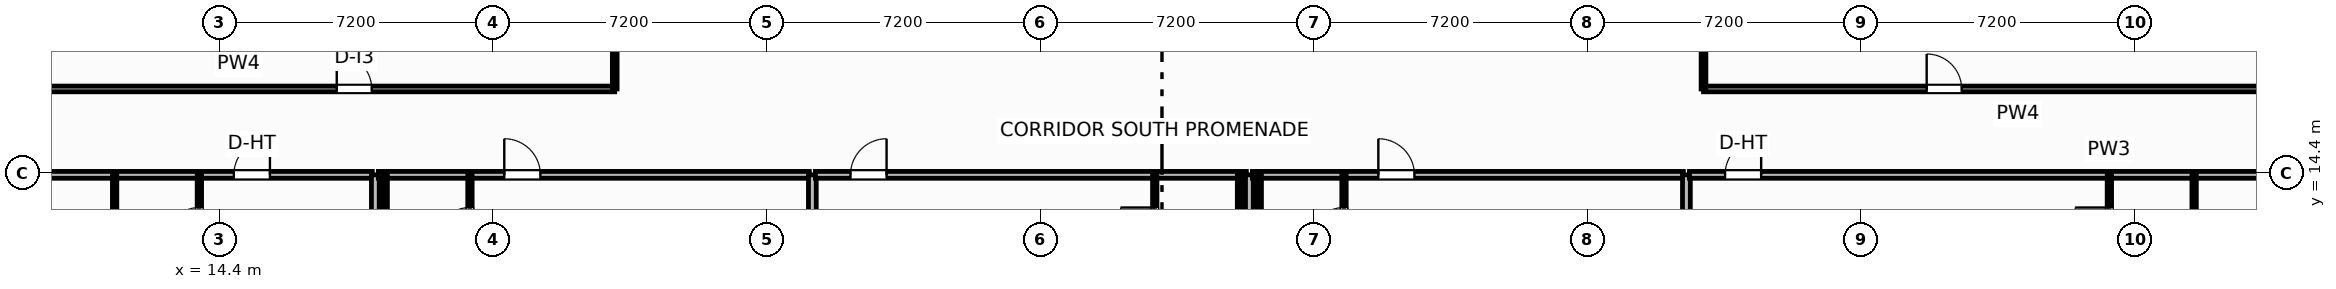
"""IFC4 building model, lengths in metres.
Left out: names, types, materials, properties, quantities, classifications, styles, units other than length and angle.
Written with IfcOpenShell. Run it as: python <this file> out.ifc"""

import sys

from ifc_helpers import new_model, si_unit, direction, frame, frame_2d, origin, place, context, subcontext, project, spatial, rectangle, extrude, element, fill, save


model = new_model("IFC4")
c1 = context("Model", 3, precision=1e-05, world=origin(), true_north=direction((0.0, 1.0)))
c2 = subcontext(c1, "Body", "Model", "MODEL_VIEW")
j1 = project(units=[si_unit("LENGTHUNIT", "METRE"), si_unit("PLANEANGLEUNIT", "RADIAN")], contexts=[c1])
p1 = place(None, origin())
s1 = spatial("IfcSite", under=j1, at=p1, CompositionType="ELEMENT")
p2 = place(p1, origin())
s2 = spatial("IfcBuilding", under=s1, at=p2, CompositionType="ELEMENT")
p3 = place(p2, frame((0.0, 0.0, 136.5)))
s3 = spatial("IfcBuildingStorey", under=s2, at=p3, CompositionType="ELEMENT", Elevation=136.5)
p4 = place(p3, frame((5.0, 16.61, 0.0), z_axis=(0.0, 0.0, 1.0), x_axis=(1.0, 0.0, 0.0)))
e1 = element("IfcWall", 1, at=p4, inside=s3, PredefinedType="PARTITIONING", context=c2, shape_type="SweptSolid", body=[
    extrude(rectangle(XDim=19.8, YDim=0.15, at=frame_2d((9.9, 0.0))), origin(), (0.0, 0.0, 1.0), 3.45),
])
p5 = place(p4, frame((12.485, 0.0, 0.0)))
e2 = element("IfcOpeningElement", 2, at=p5, cuts=e1, PredefinedType="OPENING", context=c2, shape_type="SweptSolid", body=[
    extrude(rectangle(XDim=0.92, YDim=2.05, at=frame_2d((0.46, 1.025))), frame((0.0, 0.085, 0.0), z_axis=(0.0, -1.0, 0.0), x_axis=(1.0, 0.0, 0.0)), (0.0, 0.0, 1.0), 0.17),
])
p6 = place(p3, frame((24.8, 16.61, 0.0), z_axis=(0.0, 0.0, 1.0), x_axis=(0.0, 1.0, 0.0)))
e3 = element("IfcWall", 3, at=p6, inside=s3, PredefinedType="PARTITIONING", context=c2, shape_type="SweptSolid", body=[
    extrude(rectangle(XDim=2.63, YDim=0.125, at=frame_2d((1.315, 0.0))), origin(), (0.0, 0.0, 1.0), 2.662),
])
p7 = place(p3, frame((53.45, 16.61, 0.0), z_axis=(0.0, 0.0, 1.0), x_axis=(1.0, 0.0, 0.0)))
e4 = element("IfcWall", 4, at=p7, inside=s3, PredefinedType="PARTITIONING", context=c2, shape_type="SweptSolid", body=[
    extrude(rectangle(XDim=16.55, YDim=0.15, at=frame_2d((8.275, 0.0))), origin(), (0.0, 0.0, 1.0), 3.45),
])
p8 = place(p7, frame((5.873, 0.0, 0.0)))
e5 = element("IfcOpeningElement", 5, at=p8, cuts=e4, PredefinedType="OPENING", context=c2, shape_type="SweptSolid", body=[
    extrude(rectangle(XDim=0.92, YDim=2.05, at=frame_2d((0.46, 1.025))), frame((0.0, 0.085, 0.0), z_axis=(0.0, -1.0, 0.0), x_axis=(1.0, 0.0, 0.0)), (0.0, 0.0, 1.0), 0.17),
])
p9 = place(p3, frame((53.45, 16.61, 0.0), z_axis=(0.0, 0.0, 1.0), x_axis=(0.0, 1.0, 0.0)))
e6 = element("IfcWall", 6, at=p9, inside=s3, PredefinedType="PARTITIONING", context=c2, shape_type="SweptSolid", body=[
    extrude(rectangle(XDim=2.63, YDim=0.125, at=frame_2d((1.315, 0.0))), origin(), (0.0, 0.0, 1.0), 3.45),
])
p10 = place(p3, frame((0.581, 14.35, 0.0), z_axis=(0.0, 0.0, 1.0), x_axis=(1.0, 0.0, 0.0)))
e7 = element("IfcWall", 7, at=p10, inside=s3, PredefinedType="PARTITIONING", context=c2, shape_type="SweptSolid", body=[
    extrude(rectangle(XDim=17.839, YDim=0.18, at=frame_2d((8.919, 0.0))), origin(), (0.0, 0.0, 1.0), 3.45),
])
p11 = place(p10, frame((14.196, 0.0, 0.0)))
e8 = element("IfcOpeningElement", 8, at=p11, cuts=e7, PredefinedType="OPENING", context=c2, shape_type="SweptSolid", body=[
    extrude(rectangle(XDim=0.95, YDim=2.15, at=frame_2d((0.475, 1.075))), frame((0.0, 0.1, 0.0), z_axis=(0.0, -1.0, 0.0), x_axis=(1.0, 0.0, 0.0)), (0.0, 0.0, 1.0), 0.2),
])
p12 = place(p3, frame((13.87, 11.83, 0.0), z_axis=(0.0, 0.0, 1.0), x_axis=(0.0, 1.0, 0.0)))
e9 = element("IfcWall", 9, at=p12, inside=s3, PredefinedType="PARTITIONING", context=c2, shape_type="SweptSolid", body=[
    extrude(rectangle(XDim=2.52, YDim=0.115, at=frame_2d((1.26, 0.0))), origin(), (0.0, 0.0, 1.0), 3.45),
])
p13 = place(p12, frame((0.76, 0.0, 0.0)))
e10 = element("IfcOpeningElement", 10, at=p13, cuts=e9, PredefinedType="OPENING", context=c2, shape_type="SweptSolid", body=[
    extrude(rectangle(XDim=0.9, YDim=2.05, at=frame_2d((0.45, 1.025))), frame((0.0, 0.067, 0.0), z_axis=(0.0, -1.0, 0.0), x_axis=(1.0, 0.0, 0.0)), (0.0, 0.0, 1.0), 0.135),
])
p14 = place(p3, frame((11.64, 11.83, 0.0), z_axis=(0.0, 0.0, 1.0), x_axis=(0.0, 1.0, 0.0)))
e11 = element("IfcWall", 11, at=p14, inside=s3, PredefinedType="PARTITIONING", context=c2, shape_type="SweptSolid", body=[
    extrude(rectangle(XDim=2.52, YDim=0.115, at=frame_2d((1.26, 0.0))), origin(), (0.0, 0.0, 1.0), 3.45),
])
p15 = place(p3, frame((18.5, 4.379, 0.0), z_axis=(0.0, 0.0, 1.0), x_axis=(0.0, 1.0, 0.0)))
e12 = element("IfcWall", 12, at=p15, inside=s3, PredefinedType="PARTITIONING", context=c2, shape_type="SweptSolid", body=[
    extrude(rectangle(XDim=9.971, YDim=0.205, at=frame_2d((4.985, 0.0))), origin(), (0.0, 0.0, 1.0), 3.45),
])
p16 = place(p3, frame((18.58, 14.35, 0.0), z_axis=(0.0, 0.0, 1.0), x_axis=(1.0, 0.0, 0.0)))
e13 = element("IfcWall", 13, at=p16, inside=s3, PredefinedType="PARTITIONING", context=c2, shape_type="SweptSolid", body=[
    extrude(rectangle(XDim=11.34, YDim=0.18, at=frame_2d((5.67, 0.0))), origin(), (0.0, 0.0, 1.0), 3.45),
])
p17 = place(p16, frame((3.313, 0.0, 0.0)))
e14 = element("IfcOpeningElement", 14, at=p17, cuts=e13, PredefinedType="OPENING", context=c2, shape_type="SweptSolid", body=[
    extrude(rectangle(XDim=0.95, YDim=2.15, at=frame_2d((0.475, 1.075))), frame((0.0, 0.1, 0.0), z_axis=(0.0, -1.0, 0.0), x_axis=(1.0, 0.0, 0.0)), (0.0, 0.0, 1.0), 0.2),
])
p18 = place(p3, frame((20.99, 11.83, 0.0), z_axis=(0.0, 0.0, 1.0), x_axis=(0.0, 1.0, 0.0)))
e15 = element("IfcWall", 15, at=p18, inside=s3, PredefinedType="PARTITIONING", context=c2, shape_type="SweptSolid", body=[
    extrude(rectangle(XDim=2.52, YDim=0.115, at=frame_2d((1.26, 0.0))), origin(), (0.0, 0.0, 1.0), 3.45),
])
p19 = place(p18, frame((0.76, 0.0, 0.0)))
e16 = element("IfcOpeningElement", 16, at=p19, cuts=e15, PredefinedType="OPENING", context=c2, shape_type="SweptSolid", body=[
    extrude(rectangle(XDim=0.9, YDim=2.05, at=frame_2d((0.45, 1.025))), frame((0.0, 0.067, 0.0), z_axis=(0.0, -1.0, 0.0), x_axis=(1.0, 0.0, 0.0)), (0.0, 0.0, 1.0), 0.135),
])
p20 = place(p3, frame((18.76, 11.83, 0.0), z_axis=(0.0, 0.0, 1.0), x_axis=(0.0, 1.0, 0.0)))
e17 = element("IfcWall", 17, at=p20, inside=s3, PredefinedType="PARTITIONING", context=c2, shape_type="SweptSolid", body=[
    extrude(rectangle(XDim=2.52, YDim=0.115, at=frame_2d((1.26, 0.0))), origin(), (0.0, 0.0, 1.0), 3.45),
])
p21 = place(p3, frame((30.0, 5.1, 0.0), z_axis=(0.0, 0.0, 1.0), x_axis=(0.0, 1.0, 0.0)))
e18 = element("IfcWall", 18, at=p21, inside=s3, PredefinedType="PARTITIONING", context=c2, shape_type="SweptSolid", body=[
    extrude(rectangle(XDim=9.25, YDim=0.205, at=frame_2d((4.625, 0.0))), origin(), (0.0, 0.0, 1.0), 3.45),
])
p22 = place(p3, frame((30.08, 14.35, 0.0), z_axis=(0.0, 0.0, 1.0), x_axis=(1.0, 0.0, 0.0)))
e19 = element("IfcWall", 19, at=p22, inside=s3, PredefinedType="PARTITIONING", context=c2, shape_type="SweptSolid", body=[
    extrude(rectangle(XDim=11.34, YDim=0.18, at=frame_2d((5.67, 0.0))), origin(), (0.0, 0.0, 1.0), 3.45),
])
p23 = place(p22, frame((0.923, 0.0, 0.0)))
e20 = element("IfcOpeningElement", 20, at=p23, cuts=e19, PredefinedType="OPENING", context=c2, shape_type="SweptSolid", body=[
    extrude(rectangle(XDim=0.95, YDim=2.15, at=frame_2d((0.475, 1.075))), frame((0.0, 0.1, 0.0), z_axis=(0.0, -1.0, 0.0), x_axis=(1.0, 0.0, 0.0)), (0.0, 0.0, 1.0), 0.2),
])
p24 = place(p3, frame((39.01, 11.83, 0.0), z_axis=(0.0, 0.0, 1.0), x_axis=(0.0, 1.0, 0.0)))
e21 = element("IfcWall", 21, at=p24, inside=s3, PredefinedType="PARTITIONING", context=c2, shape_type="SweptSolid", body=[
    extrude(rectangle(XDim=2.52, YDim=0.115, at=frame_2d((1.26, 0.0))), origin(), (0.0, 0.0, 1.0), 3.45),
])
p25 = place(p24, frame((0.76, 0.0, 0.0)))
e22 = element("IfcOpeningElement", 22, at=p25, cuts=e21, PredefinedType="OPENING", context=c2, shape_type="SweptSolid", body=[
    extrude(rectangle(XDim=0.9, YDim=2.05, at=frame_2d((0.45, 1.025))), frame((0.0, 0.067, 0.0), z_axis=(0.0, -1.0, 0.0), x_axis=(1.0, 0.0, 0.0)), (0.0, 0.0, 1.0), 0.135),
])
p26 = place(p3, frame((41.24, 11.83, 0.0), z_axis=(0.0, 0.0, 1.0), x_axis=(0.0, 1.0, 0.0)))
e23 = element("IfcWall", 23, at=p26, inside=s3, PredefinedType="PARTITIONING", context=c2, shape_type="SweptSolid", body=[
    extrude(rectangle(XDim=2.52, YDim=0.115, at=frame_2d((1.26, 0.0))), origin(), (0.0, 0.0, 1.0), 3.45),
])
p27 = place(p3, frame((41.5, 3.706, 0.0), z_axis=(0.0, 0.0, 1.0), x_axis=(0.0, 1.0, 0.0)))
e24 = element("IfcWall", 24, at=p27, inside=s3, PredefinedType="PARTITIONING", context=c2, shape_type="SweptSolid", body=[
    extrude(rectangle(XDim=10.644, YDim=0.205, at=frame_2d((5.322, 0.0))), origin(), (0.0, 0.0, 1.0), 3.45),
])
p28 = place(p3, frame((41.58, 14.35, 0.0), z_axis=(0.0, 0.0, 1.0), x_axis=(1.0, 0.0, 0.0)))
e25 = element("IfcWall", 25, at=p28, inside=s3, PredefinedType="PARTITIONING", context=c2, shape_type="SweptSolid", body=[
    extrude(rectangle(XDim=11.34, YDim=0.18, at=frame_2d((5.67, 0.0))), origin(), (0.0, 0.0, 1.0), 3.45),
])
p29 = place(p28, frame((3.313, 0.0, 0.0)))
e26 = element("IfcOpeningElement", 26, at=p29, cuts=e25, PredefinedType="OPENING", context=c2, shape_type="SweptSolid", body=[
    extrude(rectangle(XDim=0.95, YDim=2.15, at=frame_2d((0.475, 1.075))), frame((0.0, 0.1, 0.0), z_axis=(0.0, -1.0, 0.0), x_axis=(1.0, 0.0, 0.0)), (0.0, 0.0, 1.0), 0.2),
])
p30 = place(p3, frame((43.99, 11.83, 0.0), z_axis=(0.0, 0.0, 1.0), x_axis=(0.0, 1.0, 0.0)))
e27 = element("IfcWall", 27, at=p30, inside=s3, PredefinedType="PARTITIONING", context=c2, shape_type="SweptSolid", body=[
    extrude(rectangle(XDim=2.52, YDim=0.115, at=frame_2d((1.26, 0.0))), origin(), (0.0, 0.0, 1.0), 3.45),
])
p31 = place(p30, frame((0.76, 0.0, 0.0)))
e28 = element("IfcOpeningElement", 28, at=p31, cuts=e27, PredefinedType="OPENING", context=c2, shape_type="SweptSolid", body=[
    extrude(rectangle(XDim=0.9, YDim=2.05, at=frame_2d((0.45, 1.025))), frame((0.0, 0.067, 0.0), z_axis=(0.0, -1.0, 0.0), x_axis=(1.0, 0.0, 0.0)), (0.0, 0.0, 1.0), 0.135),
])
p32 = place(p3, frame((41.76, 11.83, 0.0), z_axis=(0.0, 0.0, 1.0), x_axis=(0.0, 1.0, 0.0)))
e29 = element("IfcWall", 29, at=p32, inside=s3, PredefinedType="PARTITIONING", context=c2, shape_type="SweptSolid", body=[
    extrude(rectangle(XDim=2.52, YDim=0.115, at=frame_2d((1.26, 0.0))), origin(), (0.0, 0.0, 1.0), 3.45),
])
p33 = place(p3, frame((53.0, 0.197, 0.0), z_axis=(0.0, 0.0, 1.0), x_axis=(0.0, 1.0, 0.0)))
e30 = element("IfcWall", 30, at=p33, inside=s3, PredefinedType="PARTITIONING", context=c2, shape_type="SweptSolid", body=[
    extrude(rectangle(XDim=14.153, YDim=0.205, at=frame_2d((7.077, 0.0))), origin(), (0.0, 0.0, 1.0), 3.45),
])
p34 = place(p3, frame((53.08, 14.35, 0.0), z_axis=(0.0, 0.0, 1.0), x_axis=(1.0, 0.0, 0.0)))
e31 = element("IfcWall", 31, at=p34, inside=s3, PredefinedType="PARTITIONING", context=c2, shape_type="SweptSolid", body=[
    extrude(rectangle(XDim=22.084, YDim=0.18, at=frame_2d((11.042, 0.0))), origin(), (0.0, 0.0, 1.0), 3.45),
])
p35 = place(p34, frame((0.937, 0.0, 0.0)))
e32 = element("IfcOpeningElement", 32, at=p35, cuts=e31, PredefinedType="OPENING", context=c2, shape_type="SweptSolid", body=[
    extrude(rectangle(XDim=0.95, YDim=2.15, at=frame_2d((0.475, 1.075))), frame((0.0, 0.1, 0.0), z_axis=(0.0, -1.0, 0.0), x_axis=(1.0, 0.0, 0.0)), (0.0, 0.0, 1.0), 0.2),
])
p36 = place(p3, frame((64.13, 11.83, 0.0), z_axis=(0.0, 0.0, 1.0), x_axis=(0.0, 1.0, 0.0)))
e33 = element("IfcWall", 33, at=p36, inside=s3, PredefinedType="PARTITIONING", context=c2, shape_type="SweptSolid", body=[
    extrude(rectangle(XDim=2.52, YDim=0.115, at=frame_2d((1.26, 0.0))), origin(), (0.0, 0.0, 1.0), 3.45),
])
p37 = place(p36, frame((0.76, 0.0, 0.0)))
e34 = element("IfcOpeningElement", 34, at=p37, cuts=e33, PredefinedType="OPENING", context=c2, shape_type="SweptSolid", body=[
    extrude(rectangle(XDim=0.9, YDim=2.05, at=frame_2d((0.45, 1.025))), frame((0.0, 0.067, 0.0), z_axis=(0.0, -1.0, 0.0), x_axis=(1.0, 0.0, 0.0)), (0.0, 0.0, 1.0), 0.135),
])
p38 = place(p3, frame((66.36, 11.83, 0.0), z_axis=(0.0, 0.0, 1.0), x_axis=(0.0, 1.0, 0.0)))
e35 = element("IfcWall", 35, at=p38, inside=s3, PredefinedType="PARTITIONING", context=c2, shape_type="SweptSolid", body=[
    extrude(rectangle(XDim=2.52, YDim=0.115, at=frame_2d((1.26, 0.0))), origin(), (0.0, 0.0, 1.0), 3.45),
])
p39 = place(p5, origin())
e36 = element("IfcDoor", 36, at=p39, inside=s3, OperationType="SINGLE_SWING_LEFT", PredefinedType="DOOR", context=c2, shape_type="SweptSolid", body=[
    extrude(rectangle(XDim=0.92, YDim=2.05, at=frame_2d((0.46, 1.025))), frame((0.0, 0.025, 0.0), z_axis=(0.0, -1.0, 0.0), x_axis=(1.0, 0.0, 0.0)), (0.0, 0.0, 1.0), 0.05),
])
fill(e2, e36)
p40 = place(p8, origin())
e37 = element("IfcDoor", 37, at=p40, inside=s3, OperationType="SINGLE_SWING_LEFT", PredefinedType="DOOR", context=c2, shape_type="SweptSolid", body=[
    extrude(rectangle(XDim=0.92, YDim=2.05, at=frame_2d((0.46, 1.025))), frame((0.0, 0.025, 0.0), z_axis=(0.0, -1.0, 0.0), x_axis=(1.0, 0.0, 0.0)), (0.0, 0.0, 1.0), 0.05),
])
fill(e5, e37)
p41 = place(p11, origin())
e38 = element("IfcDoor", 38, at=p41, inside=s3, OperationType="SINGLE_SWING_RIGHT", PredefinedType="DOOR", context=c2, shape_type="SweptSolid", body=[
    extrude(rectangle(XDim=0.95, YDim=2.15, at=frame_2d((0.475, 1.075))), frame((0.0, 0.025, 0.0), z_axis=(0.0, -1.0, 0.0), x_axis=(1.0, 0.0, 0.0)), (0.0, 0.0, 1.0), 0.05),
])
fill(e8, e38)
p42 = place(p13, origin())
e39 = element("IfcDoor", 39, at=p42, inside=s3, OperationType="SINGLE_SWING_LEFT", PredefinedType="DOOR", context=c2, shape_type="SweptSolid", body=[
    extrude(rectangle(XDim=0.9, YDim=2.05, at=frame_2d((0.45, 1.025))), frame((0.0, 0.025, 0.0), z_axis=(0.0, -1.0, 0.0), x_axis=(1.0, 0.0, 0.0)), (0.0, 0.0, 1.0), 0.05),
])
fill(e10, e39)
p43 = place(p17, origin())
e40 = element("IfcDoor", 40, at=p43, inside=s3, OperationType="SINGLE_SWING_LEFT", PredefinedType="DOOR", context=c2, shape_type="SweptSolid", body=[
    extrude(rectangle(XDim=0.95, YDim=2.15, at=frame_2d((0.475, 1.075))), frame((0.0, 0.025, 0.0), z_axis=(0.0, -1.0, 0.0), x_axis=(1.0, 0.0, 0.0)), (0.0, 0.0, 1.0), 0.05),
])
fill(e14, e40)
p44 = place(p19, origin())
e41 = element("IfcDoor", 41, at=p44, inside=s3, OperationType="SINGLE_SWING_LEFT", PredefinedType="DOOR", context=c2, shape_type="SweptSolid", body=[
    extrude(rectangle(XDim=0.9, YDim=2.05, at=frame_2d((0.45, 1.025))), frame((0.0, 0.025, 0.0), z_axis=(0.0, -1.0, 0.0), x_axis=(1.0, 0.0, 0.0)), (0.0, 0.0, 1.0), 0.05),
])
fill(e16, e41)
p45 = place(p23, origin())
e42 = element("IfcDoor", 42, at=p45, inside=s3, OperationType="SINGLE_SWING_RIGHT", PredefinedType="DOOR", context=c2, shape_type="SweptSolid", body=[
    extrude(rectangle(XDim=0.95, YDim=2.15, at=frame_2d((0.475, 1.075))), frame((0.0, 0.025, 0.0), z_axis=(0.0, -1.0, 0.0), x_axis=(1.0, 0.0, 0.0)), (0.0, 0.0, 1.0), 0.05),
])
fill(e20, e42)
p46 = place(p25, origin())
e43 = element("IfcDoor", 43, at=p46, inside=s3, OperationType="SINGLE_SWING_RIGHT", PredefinedType="DOOR", context=c2, shape_type="SweptSolid", body=[
    extrude(rectangle(XDim=0.9, YDim=2.05, at=frame_2d((0.45, 1.025))), frame((0.0, 0.025, 0.0), z_axis=(0.0, -1.0, 0.0), x_axis=(1.0, 0.0, 0.0)), (0.0, 0.0, 1.0), 0.05),
])
fill(e22, e43)
p47 = place(p29, origin())
e44 = element("IfcDoor", 44, at=p47, inside=s3, OperationType="SINGLE_SWING_LEFT", PredefinedType="DOOR", context=c2, shape_type="SweptSolid", body=[
    extrude(rectangle(XDim=0.95, YDim=2.15, at=frame_2d((0.475, 1.075))), frame((0.0, 0.025, 0.0), z_axis=(0.0, -1.0, 0.0), x_axis=(1.0, 0.0, 0.0)), (0.0, 0.0, 1.0), 0.05),
])
fill(e26, e44)
p48 = place(p31, origin())
e45 = element("IfcDoor", 45, at=p48, inside=s3, OperationType="SINGLE_SWING_LEFT", PredefinedType="DOOR", context=c2, shape_type="SweptSolid", body=[
    extrude(rectangle(XDim=0.9, YDim=2.05, at=frame_2d((0.45, 1.025))), frame((0.0, 0.025, 0.0), z_axis=(0.0, -1.0, 0.0), x_axis=(1.0, 0.0, 0.0)), (0.0, 0.0, 1.0), 0.05),
])
fill(e28, e45)
p49 = place(p35, origin())
e46 = element("IfcDoor", 46, at=p49, inside=s3, OperationType="SINGLE_SWING_RIGHT", PredefinedType="DOOR", context=c2, shape_type="SweptSolid", body=[
    extrude(rectangle(XDim=0.95, YDim=2.15, at=frame_2d((0.475, 1.075))), frame((0.0, 0.025, 0.0), z_axis=(0.0, -1.0, 0.0), x_axis=(1.0, 0.0, 0.0)), (0.0, 0.0, 1.0), 0.05),
])
fill(e32, e46)
p50 = place(p37, origin())
e47 = element("IfcDoor", 47, at=p50, inside=s3, OperationType="SINGLE_SWING_RIGHT", PredefinedType="DOOR", context=c2, shape_type="SweptSolid", body=[
    extrude(rectangle(XDim=0.9, YDim=2.05, at=frame_2d((0.45, 1.025))), frame((0.0, 0.025, 0.0), z_axis=(0.0, -1.0, 0.0), x_axis=(1.0, 0.0, 0.0)), (0.0, 0.0, 1.0), 0.05),
])
fill(e34, e47)
save(model, sys.argv[1])
